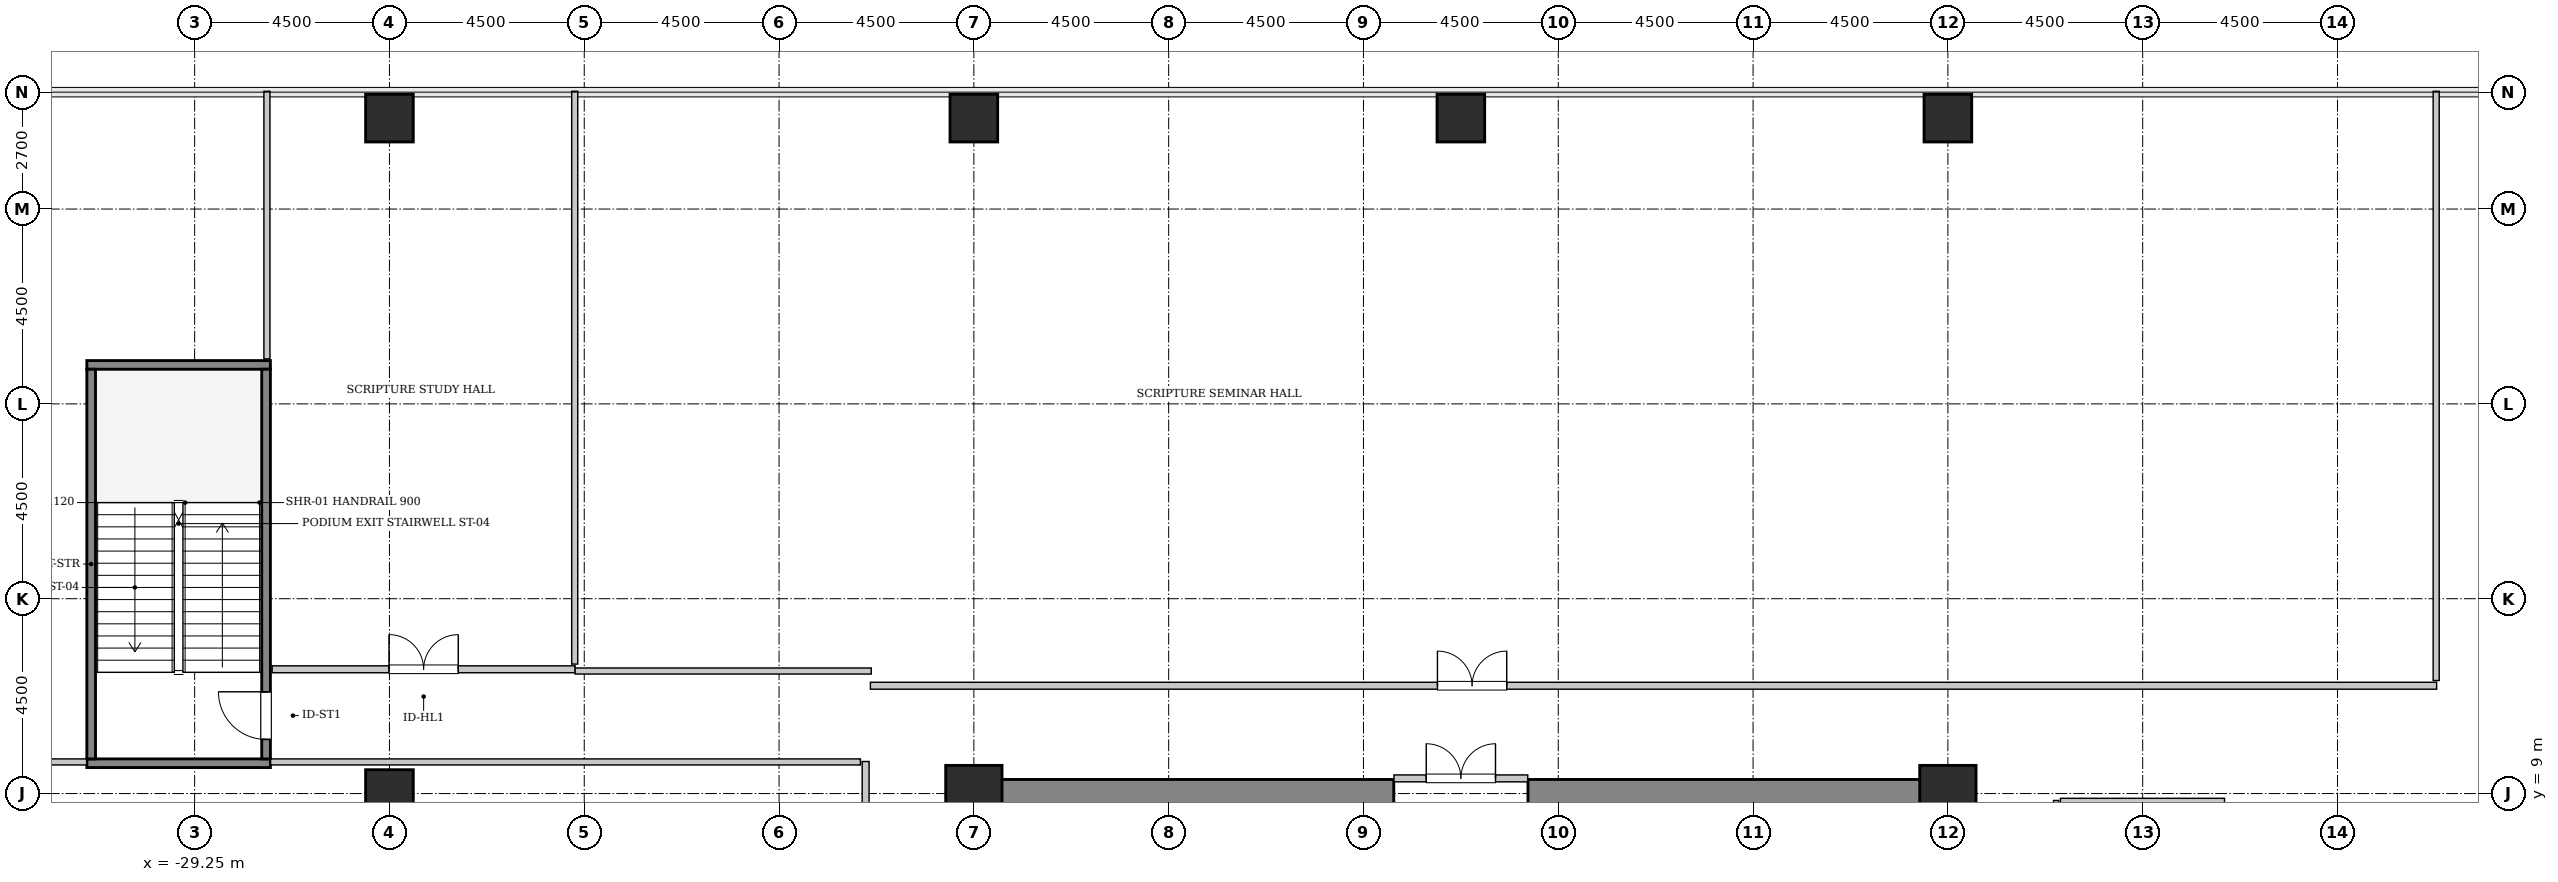
"""IFC4 building model, lengths in metres.
Left out: names, types, materials, properties, quantities, classifications, styles, units other than length and angle.
Written with IfcOpenShell. Run it as: python <this file> out.ifc"""

import sys

from ifc_helpers import new_model, si_unit, direction, frame, frame_2d, origin, origin_2d, place, context, subcontext, project, spatial, rectangle, hollow_rectangle, extrude, source, transform, mapped, element, fill, save


model = new_model("IFC4")
c1 = context("Model", 3, precision=1e-05, world=origin(), true_north=direction((0.0, 1.0)))
c2 = subcontext(c1, "Body", "Model", "MODEL_VIEW")
j1 = project(units=[si_unit("LENGTHUNIT", "METRE"), si_unit("PLANEANGLEUNIT", "RADIAN")], contexts=[c1])
p1 = place(None, origin())
s1 = spatial("IfcSite", under=j1, at=p1, CompositionType="ELEMENT")
p2 = place(p1, origin())
s2 = spatial("IfcBuilding", under=s1, at=p2, CompositionType="ELEMENT")
p3 = place(p2, frame((0.0, 0.0, 11.4)))
s3 = spatial("IfcBuildingStorey", under=s2, at=p3, CompositionType="ELEMENT", Elevation=11.4)
m1 = source(origin(), c2, "Body", "SweptSolid", [
    extrude(rectangle(XDim=10.025, YDim=0.65, at=frame_2d((5.012, 0.0))), origin(), (0.0, 0.0, 1.0), 5.4),
])
for number, where, z_axis, x_axis in (
    (1, (-11.575, 9.0, 0.0), (0.0, 0.0, 1.0), (1.0, 0.0, 0.0)),
    (2, (1.55, 9.0, 0.0), (0.0, 0.0, 1.0), (1.0, 0.0, 0.0)),
):
    element("IfcWall", number, at=place(p3, frame(where, z_axis=z_axis, x_axis=x_axis)), inside=s3, PredefinedType="SHEAR", context=c2, shape_type="MappedRepresentation", body=[
        mapped(m1, transform((0.0, 0.0, 0.0), x_axis=(1.0, 0.0, 0.0), y_axis=(0.0, 1.0, 0.0), z_axis=(0.0, 0.0, 1.0), scale=1.0)),
    ])
m2 = source(origin(), c2, "Body", "SweptSolid", [
    extrude(hollow_rectangle(XDim=1.1, YDim=1.1, WallThickness=0.055, InnerFilletRadius=0.055, OuterFilletRadius=0.11, at=origin_2d()), origin(), (0.0, 0.0, 1.0), 5.4),
])
p4 = place(p3, frame((-24.75, 9.0, 0.0), z_axis=(0.0, 0.0, 1.0), x_axis=(1.0, 0.0, 0.0)))
e3 = element("IfcColumn", 3, at=p4, inside=s3, PredefinedType="COLUMN", context=c2, shape_type="MappedRepresentation", body=[
    mapped(m2, transform((0.0, 0.0, 0.0), x_axis=(1.0, 0.0, 0.0), y_axis=(0.0, 1.0, 0.0), z_axis=(0.0, 0.0, 1.0), scale=1.0)),
])
m3 = source(origin(), c2, "Body", "SweptSolid", [
    extrude(hollow_rectangle(XDim=1.1, YDim=1.1, WallThickness=0.055, InnerFilletRadius=0.055, OuterFilletRadius=0.11, at=origin_2d()), origin(), (0.0, 0.0, 1.0), 5.4),
])
p5 = place(p3, frame((-24.75, 24.6, 0.0), z_axis=(0.0, 0.0, 1.0), x_axis=(1.0, 0.0, 0.0)))
e4 = element("IfcColumn", 4, at=p5, inside=s3, PredefinedType="COLUMN", context=c2, shape_type="MappedRepresentation", body=[
    mapped(m3, transform((0.0, 0.0, 0.0), x_axis=(1.0, 0.0, 0.0), y_axis=(0.0, 1.0, 0.0), z_axis=(0.0, 0.0, 1.0), scale=1.0)),
])
m4 = source(origin(), c2, "Body", "SweptSolid", [
    extrude(hollow_rectangle(XDim=1.3, YDim=1.3, WallThickness=0.065, InnerFilletRadius=0.065, OuterFilletRadius=0.13, at=origin_2d()), origin(), (0.0, 0.0, 1.0), 5.4),
])
p6 = place(p3, frame((-11.25, 9.0, 0.0), z_axis=(0.0, 0.0, 1.0), x_axis=(1.0, 0.0, 0.0)))
e5 = element("IfcColumn", 5, at=p6, inside=s3, PredefinedType="COLUMN", context=c2, shape_type="MappedRepresentation", body=[
    mapped(m4, transform((0.0, 0.0, 0.0), x_axis=(1.0, 0.0, 0.0), y_axis=(0.0, 1.0, 0.0), z_axis=(0.0, 0.0, 1.0), scale=1.0)),
])
for number, where, z_axis, x_axis in (
    (6, (-11.25, 24.6, 0.0), (0.0, 0.0, 1.0), (1.0, 0.0, 0.0)),
    (7, (0.0, 24.6, 0.0), (0.0, 0.0, 1.0), (1.0, 0.0, 0.0)),
):
    element("IfcColumn", number, at=place(p3, frame(where, z_axis=z_axis, x_axis=x_axis)), inside=s3, PredefinedType="COLUMN", context=c2, shape_type="MappedRepresentation", body=[
        mapped(m3, transform((0.0, 0.0, 0.0), x_axis=(1.0, 0.0, 0.0), y_axis=(0.0, 1.0, 0.0), z_axis=(0.0, 0.0, 1.0), scale=1.0)),
    ])
p7 = place(p3, frame((11.25, 9.0, 0.0), z_axis=(0.0, 0.0, 1.0), x_axis=(1.0, 0.0, 0.0)))
e8 = element("IfcColumn", 8, at=p7, inside=s3, PredefinedType="COLUMN", context=c2, shape_type="MappedRepresentation", body=[
    mapped(m4, transform((0.0, 0.0, 0.0), x_axis=(1.0, 0.0, 0.0), y_axis=(0.0, 1.0, 0.0), z_axis=(0.0, 0.0, 1.0), scale=1.0)),
])
p8 = place(p3, frame((11.25, 24.6, 0.0), z_axis=(0.0, 0.0, 1.0), x_axis=(1.0, 0.0, 0.0)))
e9 = element("IfcColumn", 9, at=p8, inside=s3, PredefinedType="COLUMN", context=c2, shape_type="MappedRepresentation", body=[
    mapped(m3, transform((0.0, 0.0, 0.0), x_axis=(1.0, 0.0, 0.0), y_axis=(0.0, 1.0, 0.0), z_axis=(0.0, 0.0, 1.0), scale=1.0)),
])
m5 = source(origin(), c2, "Body", "SweptSolid", [
    extrude(rectangle(XDim=4.24, YDim=0.2, at=frame_2d((2.12, 0.0))), origin(), (0.0, 0.0, 1.0), 5.4),
])
for number, where, z_axis, x_axis in (
    (10, (-27.5, 9.7, 0.0), (0.0, 0.0, 1.0), (-1.0, 0.0, 0.0)),
    (11, (-27.5, 18.9, 0.0), (0.0, 0.0, 1.0), (-1.0, 0.0, 0.0)),
):
    element("IfcWall", number, at=place(p3, frame(where, z_axis=z_axis, x_axis=x_axis)), inside=s3, PredefinedType="SOLIDWALL", context=c2, shape_type="MappedRepresentation", body=[
        mapped(m5, transform((0.0, 0.0, 0.0), x_axis=(1.0, 0.0, 0.0), y_axis=(0.0, 1.0, 0.0), z_axis=(0.0, 0.0, 1.0), scale=1.0)),
    ])
m6 = source(origin(), c2, "Body", "SweptSolid", [
    extrude(rectangle(XDim=9.0, YDim=0.2, at=frame_2d((4.5, 0.0))), origin(), (0.0, 0.0, 1.0), 5.4),
])
p9 = place(p3, frame((-27.6, 9.8, 0.0), z_axis=(0.0, 0.0, 1.0), x_axis=(0.0, 1.0, 0.0)))
e12 = element("IfcWall", 12, at=p9, inside=s3, PredefinedType="SOLIDWALL", context=c2, shape_type="MappedRepresentation", body=[
    mapped(m6, transform((0.0, 0.0, 0.0), x_axis=(1.0, 0.0, 0.0), y_axis=(0.0, 1.0, 0.0), z_axis=(0.0, 0.0, 1.0), scale=1.0)),
])
p10 = place(p9, frame((0.45, 0.0, 0.0)))
e13 = element("IfcOpeningElement", 13, at=p10, cuts=e12, PredefinedType="OPENING", context=c2, shape_type="SweptSolid", body=[
    extrude(rectangle(XDim=1.1, YDim=2.15, at=frame_2d((0.55, 1.075))), frame((0.0, 0.11, 0.0), z_axis=(0.0, -1.0, 0.0), x_axis=(1.0, 0.0, 0.0)), (0.0, 0.0, 1.0), 0.22),
])
p11 = place(p3, frame((-31.64, 9.8, 0.0), z_axis=(0.0, 0.0, 1.0), x_axis=(0.0, 1.0, 0.0)))
e14 = element("IfcWall", 14, at=p11, inside=s3, PredefinedType="SOLIDWALL", context=c2, shape_type="MappedRepresentation", body=[
    mapped(m6, transform((0.0, 0.0, 0.0), x_axis=(1.0, 0.0, 0.0), y_axis=(0.0, 1.0, 0.0), z_axis=(0.0, 0.0, 1.0), scale=1.0)),
])
m7 = source(origin(), c2, "Body", "SweptSolid", [
    extrude(rectangle(XDim=3.09, YDim=0.16, at=frame_2d((1.545, 0.0))), origin(), (0.0, 0.0, 1.0), 3.975),
])
p12 = place(p3, frame((-1.545, 9.35, 0.0), z_axis=(0.0, 0.0, 1.0), x_axis=(1.0, 0.0, 0.0)))
e15 = element("IfcWall", 15, at=p12, inside=s3, PredefinedType="PARTITIONING", context=c2, shape_type="MappedRepresentation", body=[
    mapped(m7, transform((0.0, 0.0, 0.0), x_axis=(1.0, 0.0, 0.0), y_axis=(0.0, 1.0, 0.0), z_axis=(0.0, 0.0, 1.0), scale=1.0)),
])
p13 = place(p12, frame((0.745, 0.0, 0.0)))
e16 = element("IfcOpeningElement", 16, at=p13, cuts=e15, PredefinedType="OPENING", context=c2, shape_type="SweptSolid", body=[
    extrude(rectangle(XDim=1.6, YDim=2.3, at=frame_2d((0.8, 1.15))), frame((0.0, 0.09, 0.0), z_axis=(0.0, -1.0, 0.0), x_axis=(1.0, 0.0, 0.0)), (0.0, 0.0, 1.0), 0.18),
])
m8 = source(origin(), c2, "Body", "SweptSolid", [
    extrude(rectangle(XDim=3.68, YDim=0.12, at=frame_2d((1.84, 0.0))), origin(), (0.0, 0.0, 1.0), 5.085),
])
p14 = place(p3, frame((13.75, 5.16, 0.0), z_axis=(0.0, 0.0, 1.0), x_axis=(0.0, 1.0, 0.0)))
e17 = element("IfcWall", 17, at=p14, inside=s3, PredefinedType="PLUMBINGWALL", context=c2, shape_type="MappedRepresentation", body=[
    mapped(m8, transform((0.0, 0.0, 0.0), x_axis=(1.0, 0.0, 0.0), y_axis=(0.0, 1.0, 0.0), z_axis=(0.0, 0.0, 1.0), scale=1.0)),
])
p15 = place(p14, frame((1.415, 0.0, 0.0)))
e18 = element("IfcOpeningElement", 18, at=p15, cuts=e17, PredefinedType="OPENING", context=c2, shape_type="SweptSolid", body=[
    extrude(rectangle(XDim=0.85, YDim=2.1, at=frame_2d((0.425, 1.05))), frame((0.0, 0.07, 0.0), z_axis=(0.0, -1.0, 0.0), x_axis=(1.0, 0.0, 0.0)), (0.0, 0.0, 1.0), 0.14),
])
m9 = source(origin(), c2, "Body", "SweptSolid", [
    extrude(rectangle(XDim=3.79, YDim=0.12, at=frame_2d((1.895, 0.0))), origin(), (0.0, 0.0, 1.0), 4.075),
])
p16 = place(p3, frame((13.85, 8.83, 0.0), z_axis=(0.0, 0.0, 1.0), x_axis=(1.0, 0.0, 0.0)))
e19 = element("IfcWall", 19, at=p16, inside=s3, PredefinedType="PLUMBINGWALL", context=c2, shape_type="MappedRepresentation", body=[
    mapped(m9, transform((0.0, 0.0, 0.0), x_axis=(1.0, 0.0, 0.0), y_axis=(0.0, 1.0, 0.0), z_axis=(0.0, 0.0, 1.0), scale=1.0)),
])
m10 = source(origin(), c2, "Body", "SweptSolid", [
    extrude(rectangle(XDim=19.48, YDim=0.16, at=frame_2d((9.74, 0.0))), origin(), (0.0, 0.0, 1.0), 5.085),
])
p17 = place(p3, frame((-13.75, -9.74, 0.0), z_axis=(0.0, 0.0, 1.0), x_axis=(0.0, 1.0, 0.0)))
e20 = element("IfcWall", 20, at=p17, inside=s3, PredefinedType="PARTITIONING", context=c2, shape_type="MappedRepresentation", body=[
    mapped(m10, transform((0.0, 0.0, 0.0), x_axis=(1.0, 0.0, 0.0), y_axis=(0.0, 1.0, 0.0), z_axis=(0.0, 0.0, 1.0), scale=1.0)),
])
p18 = place(p17, frame((8.94, 0.0, 0.0)))
e21 = element("IfcOpeningElement", 21, at=p18, cuts=e20, PredefinedType="OPENING", context=c2, shape_type="SweptSolid", body=[
    extrude(rectangle(XDim=1.6, YDim=2.3, at=frame_2d((0.8, 1.15))), frame((0.0, 0.09, 0.0), z_axis=(0.0, -1.0, 0.0), x_axis=(1.0, 0.0, 0.0)), (0.0, 0.0, 1.0), 0.18),
])
m11 = source(origin(), c2, "Body", "SweptSolid", [
    extrude(rectangle(XDim=13.625, YDim=0.14, at=frame_2d((6.812, 0.0))), origin(), (0.0, 0.0, 1.0), 5.085),
])
p19 = place(p3, frame((-27.495, 9.73, 0.0), z_axis=(0.0, 0.0, 1.0), x_axis=(1.0, 0.0, 0.0)))
e22 = element("IfcWall", 22, at=p19, inside=s3, PredefinedType="PARTITIONING", context=c2, shape_type="MappedRepresentation", body=[
    mapped(m11, transform((0.0, 0.0, 0.0), x_axis=(1.0, 0.0, 0.0), y_axis=(0.0, 1.0, 0.0), z_axis=(0.0, 0.0, 1.0), scale=1.0)),
])
m12 = source(origin(), c2, "Body", "SweptSolid", [
    extrude(rectangle(XDim=6.525, YDim=0.14, at=frame_2d((3.262, 0.0))), origin(), (0.0, 0.0, 1.0), 5.085),
])
p20 = place(p3, frame((-38.27, 9.73, 0.0), z_axis=(0.0, 0.0, 1.0), x_axis=(1.0, 0.0, 0.0)))
e23 = element("IfcWall", 23, at=p20, inside=s3, PredefinedType="PARTITIONING", context=c2, shape_type="MappedRepresentation", body=[
    mapped(m12, transform((0.0, 0.0, 0.0), x_axis=(1.0, 0.0, 0.0), y_axis=(0.0, 1.0, 0.0), z_axis=(0.0, 0.0, 1.0), scale=1.0)),
])
m13 = source(origin(), c2, "Body", "SweptSolid", [
    extrude(rectangle(XDim=7.0, YDim=0.16, at=frame_2d((3.5, 0.0))), origin(), (0.0, 0.0, 1.0), 5.085),
])
p21 = place(p3, frame((-27.46, 11.87, 0.0), z_axis=(0.0, 0.0, 1.0), x_axis=(1.0, 0.0, 0.0)))
e24 = element("IfcWall", 24, at=p21, inside=s3, PredefinedType="PARTITIONING", context=c2, shape_type="MappedRepresentation", body=[
    mapped(m13, transform((0.0, 0.0, 0.0), x_axis=(1.0, 0.0, 0.0), y_axis=(0.0, 1.0, 0.0), z_axis=(0.0, 0.0, 1.0), scale=1.0)),
])
p22 = place(p21, frame((2.7, 0.0, 0.0)))
e25 = element("IfcOpeningElement", 25, at=p22, cuts=e24, PredefinedType="OPENING", context=c2, shape_type="SweptSolid", body=[
    extrude(rectangle(XDim=1.6, YDim=2.3, at=frame_2d((0.8, 1.15))), frame((0.0, 0.09, 0.0), z_axis=(0.0, -1.0, 0.0), x_axis=(1.0, 0.0, 0.0)), (0.0, 0.0, 1.0), 0.18),
])
m14 = source(origin(), c2, "Body", "SweptSolid", [
    extrude(rectangle(XDim=6.18, YDim=0.14, at=frame_2d((3.09, 0.0))), origin(), (0.0, 0.0, 1.0), 5.085),
])
p23 = place(p3, frame((-27.58, 19.04, 0.0), z_axis=(0.0, 0.0, 1.0), x_axis=(0.0, 1.0, 0.0)))
e26 = element("IfcWall", 26, at=p23, inside=s3, PredefinedType="PARTITIONING", context=c2, shape_type="MappedRepresentation", body=[
    mapped(m14, transform((0.0, 0.0, 0.0), x_axis=(1.0, 0.0, 0.0), y_axis=(0.0, 1.0, 0.0), z_axis=(0.0, 0.0, 1.0), scale=1.0)),
])
m15 = source(origin(), c2, "Body", "SweptSolid", [
    extrude(rectangle(XDim=13.23, YDim=0.14, at=frame_2d((6.615, 0.0))), origin(), (0.0, 0.0, 1.0), 5.085),
])
p24 = place(p3, frame((-20.47, 11.99, 0.0), z_axis=(0.0, 0.0, 1.0), x_axis=(0.0, 1.0, 0.0)))
e27 = element("IfcWall", 27, at=p24, inside=s3, PredefinedType="PARTITIONING", context=c2, shape_type="MappedRepresentation", body=[
    mapped(m15, transform((0.0, 0.0, 0.0), x_axis=(1.0, 0.0, 0.0), y_axis=(0.0, 1.0, 0.0), z_axis=(0.0, 0.0, 1.0), scale=1.0)),
])
m16 = source(origin(), c2, "Body", "SweptSolid", [
    extrude(rectangle(XDim=36.18, YDim=0.16, at=frame_2d((18.09, 0.0))), origin(), (0.0, 0.0, 1.0), 5.085),
])
p25 = place(p3, frame((-13.64, 11.49, 0.0), z_axis=(0.0, 0.0, 1.0), x_axis=(1.0, 0.0, 0.0)))
e28 = element("IfcWall", 28, at=p25, inside=s3, PredefinedType="PARTITIONING", context=c2, shape_type="MappedRepresentation", body=[
    mapped(m16, transform((0.0, 0.0, 0.0), x_axis=(1.0, 0.0, 0.0), y_axis=(0.0, 1.0, 0.0), z_axis=(0.0, 0.0, 1.0), scale=1.0)),
])
p26 = place(p25, frame((13.099, 0.0, 0.0)))
e29 = element("IfcOpeningElement", 29, at=p26, cuts=e28, PredefinedType="OPENING", context=c2, shape_type="SweptSolid", body=[
    extrude(rectangle(XDim=1.6, YDim=2.3, at=frame_2d((0.8, 1.15))), frame((0.0, 0.09, 0.0), z_axis=(0.0, -1.0, 0.0), x_axis=(1.0, 0.0, 0.0)), (0.0, 0.0, 1.0), 0.18),
])
m17 = source(origin(), c2, "Body", "SweptSolid", [
    extrude(rectangle(XDim=6.84, YDim=0.14, at=frame_2d((3.42, 0.0))), origin(), (0.0, 0.0, 1.0), 5.085),
])
p27 = place(p3, frame((-20.46, 11.83, 0.0), z_axis=(0.0, 0.0, 1.0), x_axis=(1.0, 0.0, 0.0)))
e30 = element("IfcWall", 30, at=p27, inside=s3, PredefinedType="PARTITIONING", context=c2, shape_type="MappedRepresentation", body=[
    mapped(m17, transform((0.0, 0.0, 0.0), x_axis=(1.0, 0.0, 0.0), y_axis=(0.0, 1.0, 0.0), z_axis=(0.0, 0.0, 1.0), scale=1.0)),
])
m18 = source(origin(), c2, "Body", "SweptSolid", [
    extrude(rectangle(XDim=13.61, YDim=0.14, at=frame_2d((6.805, 0.0))), origin(), (0.0, 0.0, 1.0), 5.085),
])
p28 = place(p3, frame((22.53, 11.61, 0.0), z_axis=(0.0, 0.0, 1.0), x_axis=(0.0, 1.0, 0.0)))
e31 = element("IfcWall", 31, at=p28, inside=s3, PredefinedType="PARTITIONING", context=c2, shape_type="MappedRepresentation", body=[
    mapped(m18, transform((0.0, 0.0, 0.0), x_axis=(1.0, 0.0, 0.0), y_axis=(0.0, 1.0, 0.0), z_axis=(0.0, 0.0, 1.0), scale=1.0)),
])
m19 = source(origin(), c2, "Body", "SweptSolid", [
    extrude(rectangle(XDim=1.1, YDim=2.15, at=frame_2d((0.55, 1.075))), frame((0.0, 0.025, 0.0), z_axis=(0.0, -1.0, 0.0), x_axis=(1.0, 0.0, 0.0)), (0.0, 0.0, 1.0), 0.05),
])
p29 = place(p10, origin())
e32 = element("IfcDoor", 32, at=p29, inside=s3, OperationType="SINGLE_SWING_RIGHT", PredefinedType="DOOR", context=c2, shape_type="MappedRepresentation", body=[
    mapped(m19, transform((0.0, 0.0, 0.0), x_axis=(1.0, 0.0, 0.0), y_axis=(0.0, 1.0, 0.0), z_axis=(0.0, 0.0, 1.0), scale=1.0)),
])
fill(e13, e32)
m20 = source(origin(), c2, "Body", "SweptSolid", [
    extrude(rectangle(XDim=1.6, YDim=2.3, at=frame_2d((0.8, 1.15))), frame((0.0, 0.025, 0.0), z_axis=(0.0, -1.0, 0.0), x_axis=(1.0, 0.0, 0.0)), (0.0, 0.0, 1.0), 0.05),
])
p30 = place(p13, origin())
e33 = element("IfcDoor", 33, at=p30, inside=s3, OperationType="DOUBLE_DOOR_SINGLE_SWING", PredefinedType="DOOR", context=c2, shape_type="MappedRepresentation", body=[
    mapped(m20, transform((0.0, 0.0, 0.0), x_axis=(1.0, 0.0, 0.0), y_axis=(0.0, 1.0, 0.0), z_axis=(0.0, 0.0, 1.0), scale=1.0)),
])
fill(e16, e33)
p31 = place(p22, origin())
e34 = element("IfcDoor", 34, at=p31, inside=s3, OperationType="DOUBLE_DOOR_SINGLE_SWING", PredefinedType="DOOR", context=c2, shape_type="MappedRepresentation", body=[
    mapped(m20, transform((0.0, 0.0, 0.0), x_axis=(1.0, 0.0, 0.0), y_axis=(0.0, 1.0, 0.0), z_axis=(0.0, 0.0, 1.0), scale=1.0)),
])
fill(e25, e34)
p32 = place(p26, origin())
e35 = element("IfcDoor", 35, at=p32, inside=s3, OperationType="DOUBLE_DOOR_SINGLE_SWING", PredefinedType="DOOR", context=c2, shape_type="MappedRepresentation", body=[
    mapped(m20, transform((0.0, 0.0, 0.0), x_axis=(1.0, 0.0, 0.0), y_axis=(0.0, 1.0, 0.0), z_axis=(0.0, 0.0, 1.0), scale=1.0)),
])
fill(e29, e35)
save(model, sys.argv[1])
